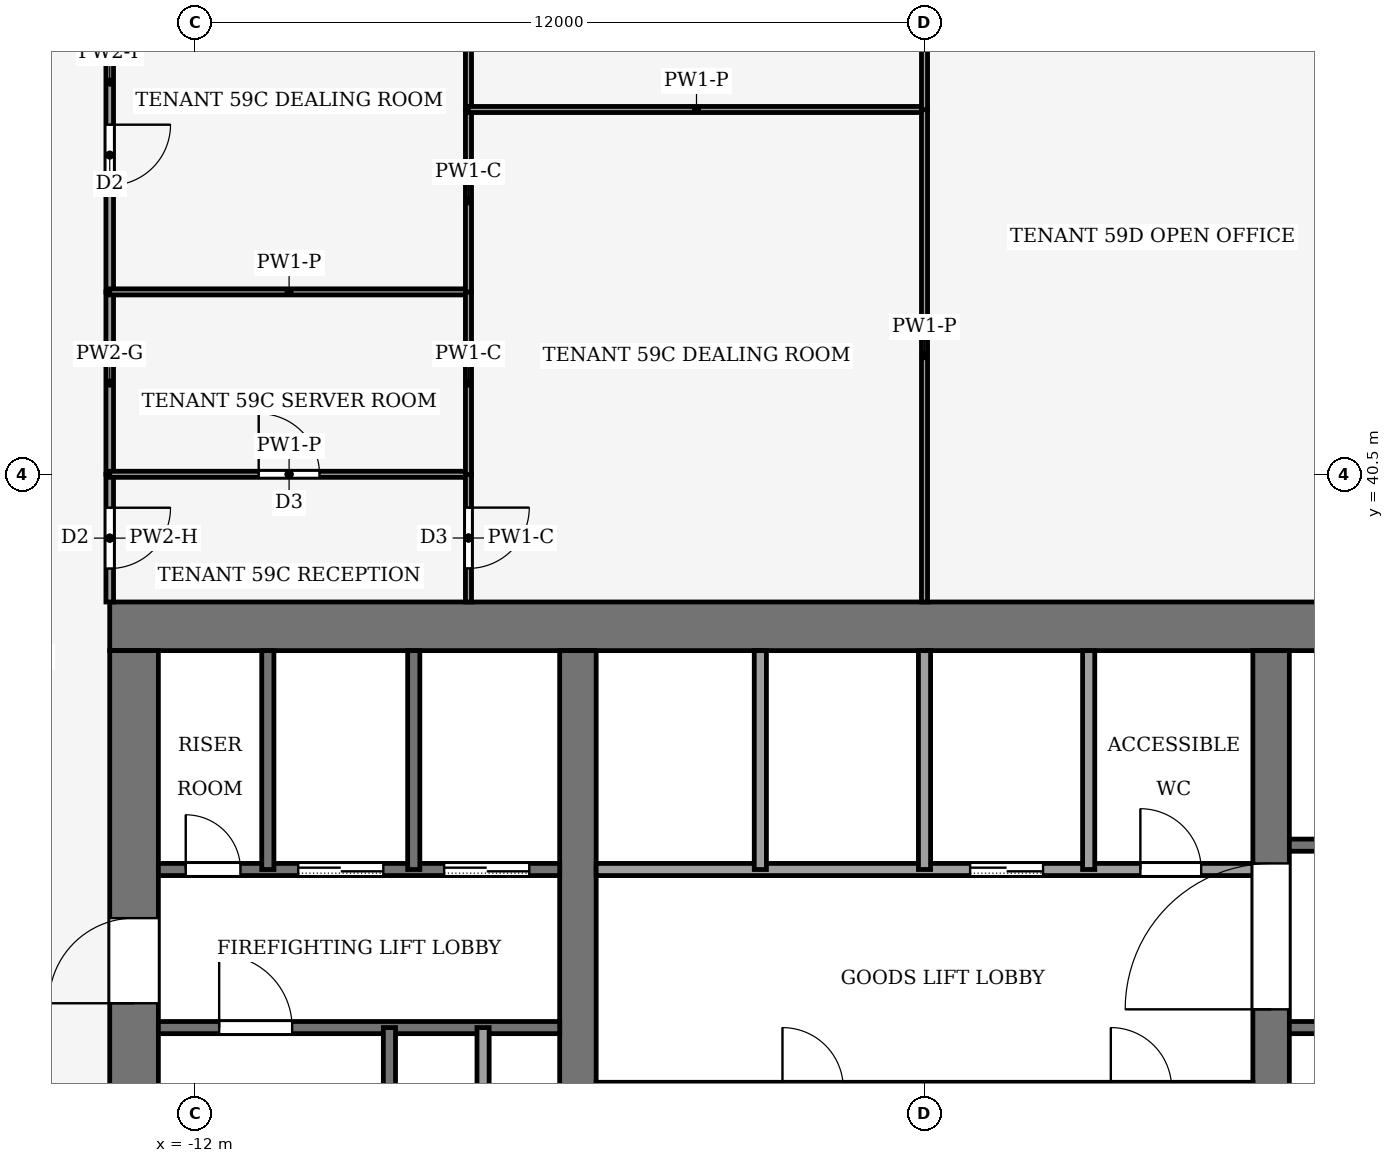
"""IFC4 building model, lengths in metres.
Left out: names, types, materials, properties, quantities, classifications, styles, units other than length and angle.
Written with IfcOpenShell. Run it as: python <this file> out.ifc"""

import sys

from ifc_helpers import new_model, si_unit, direction, frame, frame_2d, origin, place, context, subcontext, project, spatial, rectangle, extrude, element, fill, save


model = new_model("IFC4")
c1 = context("Model", 3, precision=1e-05, world=origin(), true_north=direction((0.0, 1.0)))
c2 = subcontext(c1, "Body", "Model", "MODEL_VIEW")
j1 = project(units=[si_unit("LENGTHUNIT", "METRE"), si_unit("PLANEANGLEUNIT", "RADIAN")], contexts=[c1])
p1 = place(None, origin())
s1 = spatial("IfcSite", under=j1, at=p1, CompositionType="ELEMENT")
p2 = place(p1, origin())
s2 = spatial("IfcBuilding", under=s1, at=p2, CompositionType="ELEMENT")
p3 = place(p2, frame((0.0, 0.0, 258.0)))
s3 = spatial("IfcBuildingStorey", under=s2, at=p3, CompositionType="ELEMENT", Elevation=258.0)
p4 = place(p3, frame((-13.4, 38.0, -0.13), z_axis=(0.0, 0.0, 1.0), x_axis=(1.0, 0.0, 0.0)))
e1 = element("IfcWall", 1, at=p4, inside=s3, PredefinedType="SHEAR", context=c2, shape_type="SweptSolid", body=[
    extrude(rectangle(XDim=26.8, YDim=0.8, at=frame_2d((13.4, 0.0))), origin(), (0.0, 0.0, 1.0), 4.0),
])
p5 = place(p3, frame((-13.0, 18.4, -0.13), z_axis=(0.0, 0.0, 1.0), x_axis=(0.0, 1.0, 0.0)))
e2 = element("IfcWall", 2, at=p5, inside=s3, PredefinedType="SHEAR", context=c2, shape_type="SweptSolid", body=[
    extrude(rectangle(XDim=19.2, YDim=0.8, at=frame_2d((9.6, 0.0))), origin(), (0.0, 0.0, 1.0), 4.0),
])
p6 = place(p5, frame((2.8, 0.0, 0.13)))
e3 = element("IfcOpeningElement", 3, at=p6, cuts=e2, PredefinedType="OPENING", context=c2, shape_type="SweptSolid", body=[
    extrude(rectangle(XDim=2.4, YDim=2.4, at=frame_2d((1.2, 1.2))), frame((0.0, 0.41, 0.0), z_axis=(0.0, -1.0, 0.0), x_axis=(1.0, 0.0, 0.0)), (0.0, 0.0, 1.0), 0.82),
])
p7 = place(p5, frame((13.4, 0.0, 0.13)))
e4 = element("IfcOpeningElement", 4, at=p7, cuts=e2, PredefinedType="OPENING", context=c2, shape_type="SweptSolid", body=[
    extrude(rectangle(XDim=1.4, YDim=2.2, at=frame_2d((0.7, 1.1))), frame((0.0, 0.41, 0.0), z_axis=(0.0, -1.0, 0.0), x_axis=(1.0, 0.0, 0.0)), (0.0, 0.0, 1.0), 0.82),
])
p8 = place(p3, frame((-5.7, 18.4, -0.13), z_axis=(0.0, 0.0, 1.0), x_axis=(0.0, 1.0, 0.0)))
e5 = element("IfcWall", 5, at=p8, inside=s3, PredefinedType="SHEAR", context=c2, shape_type="SweptSolid", body=[
    extrude(rectangle(XDim=19.2, YDim=0.6, at=frame_2d((9.6, 0.0))), origin(), (0.0, 0.0, 1.0), 4.0),
])
p9 = place(p8, frame((8.35, 0.0, 0.13)))
e6 = element("IfcOpeningElement", 6, at=p9, cuts=e5, PredefinedType="OPENING", context=c2, shape_type="SweptSolid", body=[
    extrude(rectangle(XDim=0.9, YDim=2.1, at=frame_2d((0.45, 1.05))), frame((0.0, 0.31, 0.0), z_axis=(0.0, -1.0, 0.0), x_axis=(1.0, 0.0, 0.0)), (0.0, 0.0, 1.0), 0.62),
])
p10 = place(p3, frame((5.7, 18.4, -0.13), z_axis=(0.0, 0.0, 1.0), x_axis=(0.0, 1.0, 0.0)))
e7 = element("IfcWall", 7, at=p10, inside=s3, PredefinedType="SHEAR", context=c2, shape_type="SweptSolid", body=[
    extrude(rectangle(XDim=19.2, YDim=0.6, at=frame_2d((9.6, 0.0))), origin(), (0.0, 0.0, 1.0), 4.0),
])
p11 = place(p10, frame((8.35, 0.0, 0.13)))
e8 = element("IfcOpeningElement", 8, at=p11, cuts=e7, PredefinedType="OPENING", context=c2, shape_type="SweptSolid", body=[
    extrude(rectangle(XDim=0.9, YDim=2.1, at=frame_2d((0.45, 1.05))), frame((0.0, 0.31, 0.0), z_axis=(0.0, -1.0, 0.0), x_axis=(1.0, 0.0, 0.0)), (0.0, 0.0, 1.0), 0.62),
])
p12 = place(p10, frame((13.3, 0.0, 0.13)))
e9 = element("IfcOpeningElement", 9, at=p12, cuts=e7, PredefinedType="OPENING", context=c2, shape_type="SweptSolid", body=[
    extrude(rectangle(XDim=2.4, YDim=2.4, at=frame_2d((1.2, 1.2))), frame((0.0, 0.31, 0.0), z_axis=(0.0, -1.0, 0.0), x_axis=(1.0, 0.0, 0.0)), (0.0, 0.0, 1.0), 0.62),
])
p13 = place(p3, frame((-12.6, 31.4, 0.0), z_axis=(0.0, 0.0, 1.0), x_axis=(1.0, 0.0, 0.0)))
e10 = element("IfcWall", 10, at=p13, inside=s3, PredefinedType="PARTITIONING", context=c2, shape_type="SweptSolid", body=[
    extrude(rectangle(XDim=6.6, YDim=0.2, at=frame_2d((3.3, 0.0))), origin(), (0.0, 0.0, 1.0), 3.87),
])
p14 = place(p13, frame((1.0, 0.0, 0.0)))
e11 = element("IfcOpeningElement", 11, at=p14, cuts=e10, PredefinedType="OPENING", context=c2, shape_type="SweptSolid", body=[
    extrude(rectangle(XDim=1.2, YDim=2.2, at=frame_2d((0.6, 1.1))), frame((0.0, 0.11, 0.0), z_axis=(0.0, -1.0, 0.0), x_axis=(1.0, 0.0, 0.0)), (0.0, 0.0, 1.0), 0.22),
])
p15 = place(p3, frame((6.0, 31.4, 0.0), z_axis=(0.0, 0.0, 1.0), x_axis=(1.0, 0.0, 0.0)))
e12 = element("IfcWall", 12, at=p15, inside=s3, PredefinedType="PARTITIONING", context=c2, shape_type="SweptSolid", body=[
    extrude(rectangle(XDim=6.6, YDim=0.2, at=frame_2d((3.3, 0.0))), origin(), (0.0, 0.0, 1.0), 3.87),
])
p16 = place(p3, frame((-12.6, 34.0, 0.0), z_axis=(0.0, 0.0, 1.0), x_axis=(1.0, 0.0, 0.0)))
e13 = element("IfcWall", 13, at=p16, inside=s3, PredefinedType="PARTITIONING", context=c2, shape_type="SweptSolid", body=[
    extrude(rectangle(XDim=6.6, YDim=0.2, at=frame_2d((3.3, 0.0))), origin(), (0.0, 0.0, 1.0), 3.87),
])
p17 = place(p16, frame((4.7, 0.0, 0.0)))
e14 = element("IfcOpeningElement", 14, at=p17, cuts=e13, PredefinedType="OPENING", context=c2, shape_type="SweptSolid", body=[
    extrude(rectangle(XDim=1.4, YDim=2.2, at=frame_2d((0.7, 1.1))), frame((0.0, 0.11, 0.0), z_axis=(0.0, -1.0, 0.0), x_axis=(1.0, 0.0, 0.0)), (0.0, 0.0, 1.0), 0.22),
])
p18 = place(p16, frame((2.3, 0.0, 0.0)))
e15 = element("IfcOpeningElement", 15, at=p18, cuts=e13, PredefinedType="OPENING", context=c2, shape_type="SweptSolid", body=[
    extrude(rectangle(XDim=1.4, YDim=2.2, at=frame_2d((0.7, 1.1))), frame((0.0, 0.11, 0.0), z_axis=(0.0, -1.0, 0.0), x_axis=(1.0, 0.0, 0.0)), (0.0, 0.0, 1.0), 0.22),
])
p19 = place(p16, frame((0.45, 0.0, 0.0)))
e16 = element("IfcOpeningElement", 16, at=p19, cuts=e13, PredefinedType="OPENING", context=c2, shape_type="SweptSolid", body=[
    extrude(rectangle(XDim=0.9, YDim=2.1, at=frame_2d((0.45, 1.05))), frame((0.0, 0.11, 0.0), z_axis=(0.0, -1.0, 0.0), x_axis=(1.0, 0.0, 0.0)), (0.0, 0.0, 1.0), 0.22),
])
p20 = place(p3, frame((-5.4, 34.0, 0.0), z_axis=(0.0, 0.0, 1.0), x_axis=(1.0, 0.0, 0.0)))
e17 = element("IfcWall", 17, at=p20, inside=s3, PredefinedType="PARTITIONING", context=c2, shape_type="SweptSolid", body=[
    extrude(rectangle(XDim=10.8, YDim=0.2, at=frame_2d((5.4, 0.0))), origin(), (0.0, 0.0, 1.0), 3.87),
])
p21 = place(p20, frame((6.15, 0.0, 0.0)))
e18 = element("IfcOpeningElement", 18, at=p21, cuts=e17, PredefinedType="OPENING", context=c2, shape_type="SweptSolid", body=[
    extrude(rectangle(XDim=1.2, YDim=2.2, at=frame_2d((0.6, 1.1))), frame((0.0, 0.11, 0.0), z_axis=(0.0, -1.0, 0.0), x_axis=(1.0, 0.0, 0.0)), (0.0, 0.0, 1.0), 0.22),
])
p22 = place(p20, frame((8.95, 0.0, 0.0)))
e19 = element("IfcOpeningElement", 19, at=p22, cuts=e17, PredefinedType="OPENING", context=c2, shape_type="SweptSolid", body=[
    extrude(rectangle(XDim=1.0, YDim=2.1, at=frame_2d((0.5, 1.05))), frame((0.0, 0.11, 0.0), z_axis=(0.0, -1.0, 0.0), x_axis=(1.0, 0.0, 0.0)), (0.0, 0.0, 1.0), 0.22),
])
p23 = place(p3, frame((6.0, 34.4, 0.0), z_axis=(0.0, 0.0, 1.0), x_axis=(1.0, 0.0, 0.0)))
e20 = element("IfcWall", 20, at=p23, inside=s3, PredefinedType="PARTITIONING", context=c2, shape_type="SweptSolid", body=[
    extrude(rectangle(XDim=6.6, YDim=0.2, at=frame_2d((3.3, 0.0))), origin(), (0.0, 0.0, 1.0), 3.87),
])
p24 = place(p23, frame((4.8, 0.0, 0.0)))
e21 = element("IfcOpeningElement", 21, at=p24, cuts=e20, PredefinedType="OPENING", context=c2, shape_type="SweptSolid", body=[
    extrude(rectangle(XDim=1.2, YDim=2.2, at=frame_2d((0.6, 1.1))), frame((0.0, 0.11, 0.0), z_axis=(0.0, -1.0, 0.0), x_axis=(1.0, 0.0, 0.0)), (0.0, 0.0, 1.0), 0.22),
])
p25 = place(p3, frame((-10.8, 34.0, 0.0), z_axis=(0.0, 0.0, 1.0), x_axis=(0.0, 1.0, 0.0)))
e22 = element("IfcWall", 22, at=p25, inside=s3, PredefinedType="PARTITIONING", context=c2, shape_type="SweptSolid", body=[
    extrude(rectangle(XDim=3.6, YDim=0.2, at=frame_2d((1.8, 0.0))), origin(), (0.0, 0.0, 1.0), 3.87),
])
p26 = place(p3, frame((-8.8, 24.0, 0.0), z_axis=(0.0, 0.0, 1.0), x_axis=(0.0, 1.0, 0.0)))
e23 = element("IfcWall", 23, at=p26, inside=s3, PredefinedType="PARTITIONING", context=c2, shape_type="SweptSolid", body=[
    extrude(rectangle(XDim=7.4, YDim=0.2, at=frame_2d((3.7, 0.0))), origin(), (0.0, 0.0, 1.0), 3.87),
])
p27 = place(p3, frame((-8.4, 34.0, 0.0), z_axis=(0.0, 0.0, 1.0), x_axis=(0.0, 1.0, 0.0)))
e24 = element("IfcWall", 24, at=p27, inside=s3, PredefinedType="PARTITIONING", context=c2, shape_type="SweptSolid", body=[
    extrude(rectangle(XDim=3.6, YDim=0.2, at=frame_2d((1.8, 0.0))), origin(), (0.0, 0.0, 1.0), 3.87),
])
p28 = place(p3, frame((-7.26, 24.0, 0.0), z_axis=(0.0, 0.0, 1.0), x_axis=(0.0, 1.0, 0.0)))
e25 = element("IfcWall", 25, at=p28, inside=s3, PredefinedType="PARTITIONING", context=c2, shape_type="SweptSolid", body=[
    extrude(rectangle(XDim=7.4, YDim=0.2, at=frame_2d((3.7, 0.0))), origin(), (0.0, 0.0, 1.0), 3.87),
])
for number, where, z_axis, x_axis in (
    (26, (-2.7, 34.0, 0.0), (0.0, 0.0, 1.0), (0.0, 1.0, 0.0)),
    (27, (0.0, 34.0, 0.0), (0.0, 0.0, 1.0), (0.0, 1.0, 0.0)),
    (28, (2.7, 34.0, 0.0), (0.0, 0.0, 1.0), (0.0, 1.0, 0.0)),
):
    element("IfcWall", number, at=place(p3, frame(where, z_axis=z_axis, x_axis=x_axis)), inside=s3, PredefinedType="PARTITIONING", context=c2, shape_type="SweptSolid", body=[
        extrude(rectangle(XDim=3.6, YDim=0.2, at=frame_2d((1.8, 0.0))), origin(), (0.0, 0.0, 1.0), 3.87),
    ])
p29 = place(p3, frame((-13.4, 40.5, 0.0), z_axis=(0.0, 0.0, 1.0), x_axis=(0.0, -1.0, 0.0)))
e29 = element("IfcWall", 29, at=p29, inside=s3, PredefinedType="PARTITIONING", context=c2, shape_type="SweptSolid", body=[
    extrude(rectangle(XDim=2.1, YDim=0.125, at=frame_2d((1.05, 0.0))), origin(), (0.0, 0.0, 1.0), 3.14),
])
p30 = place(p29, frame((0.55, 0.0, 0.0)))
e30 = element("IfcOpeningElement", 30, at=p30, cuts=e29, PredefinedType="OPENING", context=c2, shape_type="SweptSolid", body=[
    extrude(rectangle(XDim=1.0, YDim=2.1, at=frame_2d((0.5, 1.05))), frame((0.0, 0.073, 0.0), z_axis=(0.0, -1.0, 0.0), x_axis=(1.0, 0.0, 0.0)), (0.0, 0.0, 1.0), 0.145),
])
p31 = place(p3, frame((-13.4, 40.5, 0.0), z_axis=(0.0, 0.0, 1.0), x_axis=(0.0, 1.0, 0.0)))
e31 = element("IfcWall", 31, at=p31, inside=s3, PredefinedType="PARTITIONING", context=c2, shape_type="SweptSolid", body=[
    extrude(rectangle(XDim=3.0, YDim=0.125, at=frame_2d((1.5, 0.0))), origin(), (0.0, 0.0, 1.0), 3.87),
])
p32 = place(p3, frame((-13.4, 50.4, 0.0), z_axis=(0.0, 0.0, 1.0), x_axis=(0.0, -1.0, 0.0)))
e32 = element("IfcWall", 32, at=p32, inside=s3, PredefinedType="PARTITIONING", context=c2, shape_type="SweptSolid", body=[
    extrude(rectangle(XDim=6.9, YDim=0.125, at=frame_2d((3.45, 0.0))), origin(), (0.0, 0.0, 1.0), 3.24),
])
p33 = place(p32, frame((4.15, 0.0, 0.0)))
e33 = element("IfcOpeningElement", 33, at=p33, cuts=e32, PredefinedType="OPENING", context=c2, shape_type="SweptSolid", body=[
    extrude(rectangle(XDim=1.0, YDim=2.1, at=frame_2d((0.5, 1.05))), frame((0.0, 0.073, 0.0), z_axis=(0.0, -1.0, 0.0), x_axis=(1.0, 0.0, 0.0)), (0.0, 0.0, 1.0), 0.145),
])
p34 = place(p3, frame((-13.4, 40.5, 0.0), z_axis=(0.0, 0.0, 1.0), x_axis=(1.0, 0.0, 0.0)))
e34 = element("IfcWall", 34, at=p34, inside=s3, PredefinedType="PARTITIONING", context=c2, shape_type="SweptSolid", body=[
    extrude(rectangle(XDim=5.9, YDim=0.1, at=frame_2d((2.95, 0.0))), origin(), (0.0, 0.0, 1.0), 3.44),
])
p35 = place(p34, frame((2.45, 0.0, 0.0)))
e35 = element("IfcOpeningElement", 35, at=p35, cuts=e34, PredefinedType="OPENING", context=c2, shape_type="SweptSolid", body=[
    extrude(rectangle(XDim=1.0, YDim=2.1, at=frame_2d((0.5, 1.05))), frame((0.0, 0.06, 0.0), z_axis=(0.0, -1.0, 0.0), x_axis=(1.0, 0.0, 0.0)), (0.0, 0.0, 1.0), 0.12),
])
p36 = place(p3, frame((-7.5, 40.504, 0.0), z_axis=(0.0, 0.0, 1.0), x_axis=(0.0, -1.0, 0.0)))
e36 = element("IfcWall", 36, at=p36, inside=s3, PredefinedType="PARTITIONING", context=c2, shape_type="SweptSolid", body=[
    extrude(rectangle(XDim=2.104, YDim=0.1, at=frame_2d((1.052, 0.0))), origin(), (0.0, 0.0, 1.0), 3.87),
])
p37 = place(p36, frame((0.552, 0.0, 0.0)))
e37 = element("IfcOpeningElement", 37, at=p37, cuts=e36, PredefinedType="OPENING", context=c2, shape_type="SweptSolid", body=[
    extrude(rectangle(XDim=1.0, YDim=2.1, at=frame_2d((0.5, 1.05))), frame((0.0, 0.06, 0.0), z_axis=(0.0, -1.0, 0.0), x_axis=(1.0, 0.0, 0.0)), (0.0, 0.0, 1.0), 0.12),
])
p38 = place(p3, frame((-7.5, 43.5, 0.0), z_axis=(0.0, 0.0, 1.0), x_axis=(-1.0, 0.0, 0.0)))
e38 = element("IfcWall", 38, at=p38, inside=s3, PredefinedType="PARTITIONING", context=c2, shape_type="SweptSolid", body=[
    extrude(rectangle(XDim=5.9, YDim=0.1, at=frame_2d((2.95, 0.0))), origin(), (0.0, 0.0, 1.0), 3.44),
])
p39 = place(p3, frame((-7.5, 40.496, 0.0), z_axis=(0.0, 0.0, 1.0), x_axis=(0.0, 1.0, 0.0)))
e39 = element("IfcWall", 39, at=p39, inside=s3, PredefinedType="PARTITIONING", context=c2, shape_type="SweptSolid", body=[
    extrude(rectangle(XDim=3.008, YDim=0.1, at=frame_2d((1.504, 0.0))), origin(), (0.0, 0.0, 1.0), 3.87),
])
p40 = place(p3, frame((-7.5, 43.496, 0.0), z_axis=(0.0, 0.0, 1.0), x_axis=(0.0, 1.0, 0.0)))
e40 = element("IfcWall", 40, at=p40, inside=s3, PredefinedType="PARTITIONING", context=c2, shape_type="SweptSolid", body=[
    extrude(rectangle(XDim=3.004, YDim=0.1, at=frame_2d((1.502, 0.0))), origin(), (0.0, 0.0, 1.0), 3.87),
])
p41 = place(p3, frame((-7.5, 46.5, 0.0), z_axis=(0.0, 0.0, 1.0), x_axis=(0.0, 1.0, 0.0)))
e41 = element("IfcWall", 41, at=p41, inside=s3, PredefinedType="PARTITIONING", context=c2, shape_type="SweptSolid", body=[
    extrude(rectangle(XDim=3.9, YDim=0.1, at=frame_2d((1.95, 0.0))), origin(), (0.0, 0.0, 1.0), 3.24),
])
p42 = place(p3, frame((0.0, 46.5, 0.0), z_axis=(0.0, 0.0, 1.0), x_axis=(-1.0, 0.0, 0.0)))
e42 = element("IfcWall", 42, at=p42, inside=s3, PredefinedType="PARTITIONING", context=c2, shape_type="SweptSolid", body=[
    extrude(rectangle(XDim=7.5, YDim=0.1, at=frame_2d((3.75, 0.0))), origin(), (0.0, 0.0, 1.0), 3.44),
])
p43 = place(p3, frame((0.0, 38.4, 0.0), z_axis=(0.0, 0.0, 1.0), x_axis=(0.0, 1.0, 0.0)))
e43 = element("IfcWall", 43, at=p43, inside=s3, PredefinedType="PARTITIONING", context=c2, shape_type="SweptSolid", body=[
    extrude(rectangle(XDim=8.104, YDim=0.1, at=frame_2d((4.052, 0.0))), origin(), (0.0, 0.0, 1.0), 3.44),
])
p44 = place(p3, frame((0.0, 46.496, 0.0), z_axis=(0.0, 0.0, 1.0), x_axis=(0.0, 1.0, 0.0)))
e44 = element("IfcWall", 44, at=p44, inside=s3, PredefinedType="PARTITIONING", context=c2, shape_type="SweptSolid", body=[
    extrude(rectangle(XDim=3.904, YDim=0.1, at=frame_2d((1.952, 0.0))), origin(), (0.0, 0.0, 1.0), 3.29),
])
p45 = place(p21, origin())
e45 = element("IfcDoor", 45, at=p45, inside=s3, OperationType="SLIDING_TO_LEFT", PredefinedType="DOOR", context=c2, shape_type="SweptSolid", body=[
    extrude(rectangle(XDim=1.2, YDim=2.2, at=frame_2d((0.6, 1.1))), frame((0.0, 0.025, 0.0), z_axis=(0.0, -1.0, 0.0), x_axis=(1.0, 0.0, 0.0)), (0.0, 0.0, 1.0), 0.05),
])
fill(e18, e45)
p46 = place(p17, origin())
e46 = element("IfcDoor", 46, at=p46, inside=s3, OperationType="SLIDING_TO_LEFT", PredefinedType="DOOR", context=c2, shape_type="SweptSolid", body=[
    extrude(rectangle(XDim=1.4, YDim=2.2, at=frame_2d((0.7, 1.1))), frame((0.0, 0.025, 0.0), z_axis=(0.0, -1.0, 0.0), x_axis=(1.0, 0.0, 0.0)), (0.0, 0.0, 1.0), 0.05),
])
fill(e14, e46)
p47 = place(p18, origin())
e47 = element("IfcDoor", 47, at=p47, inside=s3, OperationType="SLIDING_TO_LEFT", PredefinedType="DOOR", context=c2, shape_type="SweptSolid", body=[
    extrude(rectangle(XDim=1.4, YDim=2.2, at=frame_2d((0.7, 1.1))), frame((0.0, 0.025, 0.0), z_axis=(0.0, -1.0, 0.0), x_axis=(1.0, 0.0, 0.0)), (0.0, 0.0, 1.0), 0.05),
])
fill(e15, e47)
p48 = place(p19, origin())
e48 = element("IfcDoor", 48, at=p48, inside=s3, OperationType="SINGLE_SWING_RIGHT", PredefinedType="DOOR", context=c2, shape_type="SweptSolid", body=[
    extrude(rectangle(XDim=0.9, YDim=2.1, at=frame_2d((0.45, 1.05))), frame((0.0, 0.025, 0.0), z_axis=(0.0, -1.0, 0.0), x_axis=(1.0, 0.0, 0.0)), (0.0, 0.0, 1.0), 0.05),
])
fill(e16, e48)
p49 = place(p22, origin())
e49 = element("IfcDoor", 49, at=p49, inside=s3, OperationType="SINGLE_SWING_LEFT", PredefinedType="DOOR", context=c2, shape_type="SweptSolid", body=[
    extrude(rectangle(XDim=1.0, YDim=2.1, at=frame_2d((0.5, 1.05))), frame((0.0, 0.025, 0.0), z_axis=(0.0, -1.0, 0.0), x_axis=(1.0, 0.0, 0.0)), (0.0, 0.0, 1.0), 0.05),
])
fill(e19, e49)
p50 = place(p14, origin())
e50 = element("IfcDoor", 50, at=p50, inside=s3, OperationType="SINGLE_SWING_RIGHT", PredefinedType="DOOR", context=c2, shape_type="SweptSolid", body=[
    extrude(rectangle(XDim=1.2, YDim=2.2, at=frame_2d((0.6, 1.1))), frame((0.0, 0.025, 0.0), z_axis=(0.0, -1.0, 0.0), x_axis=(1.0, 0.0, 0.0)), (0.0, 0.0, 1.0), 0.05),
])
fill(e11, e50)
p51 = place(p12, origin())
e51 = element("IfcDoor", 51, at=p51, inside=s3, OperationType="DOUBLE_DOOR_SINGLE_SWING", PredefinedType="DOOR", context=c2, shape_type="SweptSolid", body=[
    extrude(rectangle(XDim=2.4, YDim=2.4, at=frame_2d((1.2, 1.2))), frame((0.0, 0.025, 0.0), z_axis=(0.0, -1.0, 0.0), x_axis=(1.0, 0.0, 0.0)), (0.0, 0.0, 1.0), 0.05),
])
fill(e9, e51)
p52 = place(p7, origin())
e52 = element("IfcDoor", 52, at=p52, inside=s3, OperationType="SINGLE_SWING_RIGHT", PredefinedType="DOOR", context=c2, shape_type="SweptSolid", body=[
    extrude(rectangle(XDim=1.4, YDim=2.2, at=frame_2d((0.7, 1.1))), frame((0.0, 0.025, 0.0), z_axis=(0.0, -1.0, 0.0), x_axis=(1.0, 0.0, 0.0)), (0.0, 0.0, 1.0), 0.05),
])
fill(e4, e52)
p53 = place(p30, origin())
e53 = element("IfcDoor", 53, at=p53, inside=s3, OperationType="SINGLE_SWING_RIGHT", PredefinedType="DOOR", context=c2, shape_type="SweptSolid", body=[
    extrude(rectangle(XDim=1.0, YDim=2.1, at=frame_2d((0.5, 1.05))), frame((0.0, 0.025, 0.0), z_axis=(0.0, -1.0, 0.0), x_axis=(1.0, 0.0, 0.0)), (0.0, 0.0, 1.0), 0.05),
])
fill(e30, e53)
p54 = place(p33, origin())
e54 = element("IfcDoor", 54, at=p54, inside=s3, OperationType="SINGLE_SWING_RIGHT", PredefinedType="DOOR", context=c2, shape_type="SweptSolid", body=[
    extrude(rectangle(XDim=1.0, YDim=2.1, at=frame_2d((0.5, 1.05))), frame((0.0, 0.025, 0.0), z_axis=(0.0, -1.0, 0.0), x_axis=(1.0, 0.0, 0.0)), (0.0, 0.0, 1.0), 0.05),
])
fill(e33, e54)
p55 = place(p35, origin())
e55 = element("IfcDoor", 55, at=p55, inside=s3, OperationType="SINGLE_SWING_LEFT", PredefinedType="DOOR", context=c2, shape_type="SweptSolid", body=[
    extrude(rectangle(XDim=1.0, YDim=2.1, at=frame_2d((0.5, 1.05))), frame((0.0, 0.025, 0.0), z_axis=(0.0, -1.0, 0.0), x_axis=(1.0, 0.0, 0.0)), (0.0, 0.0, 1.0), 0.05),
])
fill(e35, e55)
p56 = place(p37, origin())
e56 = element("IfcDoor", 56, at=p56, inside=s3, OperationType="SINGLE_SWING_RIGHT", PredefinedType="DOOR", context=c2, shape_type="SweptSolid", body=[
    extrude(rectangle(XDim=1.0, YDim=2.1, at=frame_2d((0.5, 1.05))), frame((0.0, 0.025, 0.0), z_axis=(0.0, -1.0, 0.0), x_axis=(1.0, 0.0, 0.0)), (0.0, 0.0, 1.0), 0.05),
])
fill(e37, e56)
save(model, sys.argv[1])
